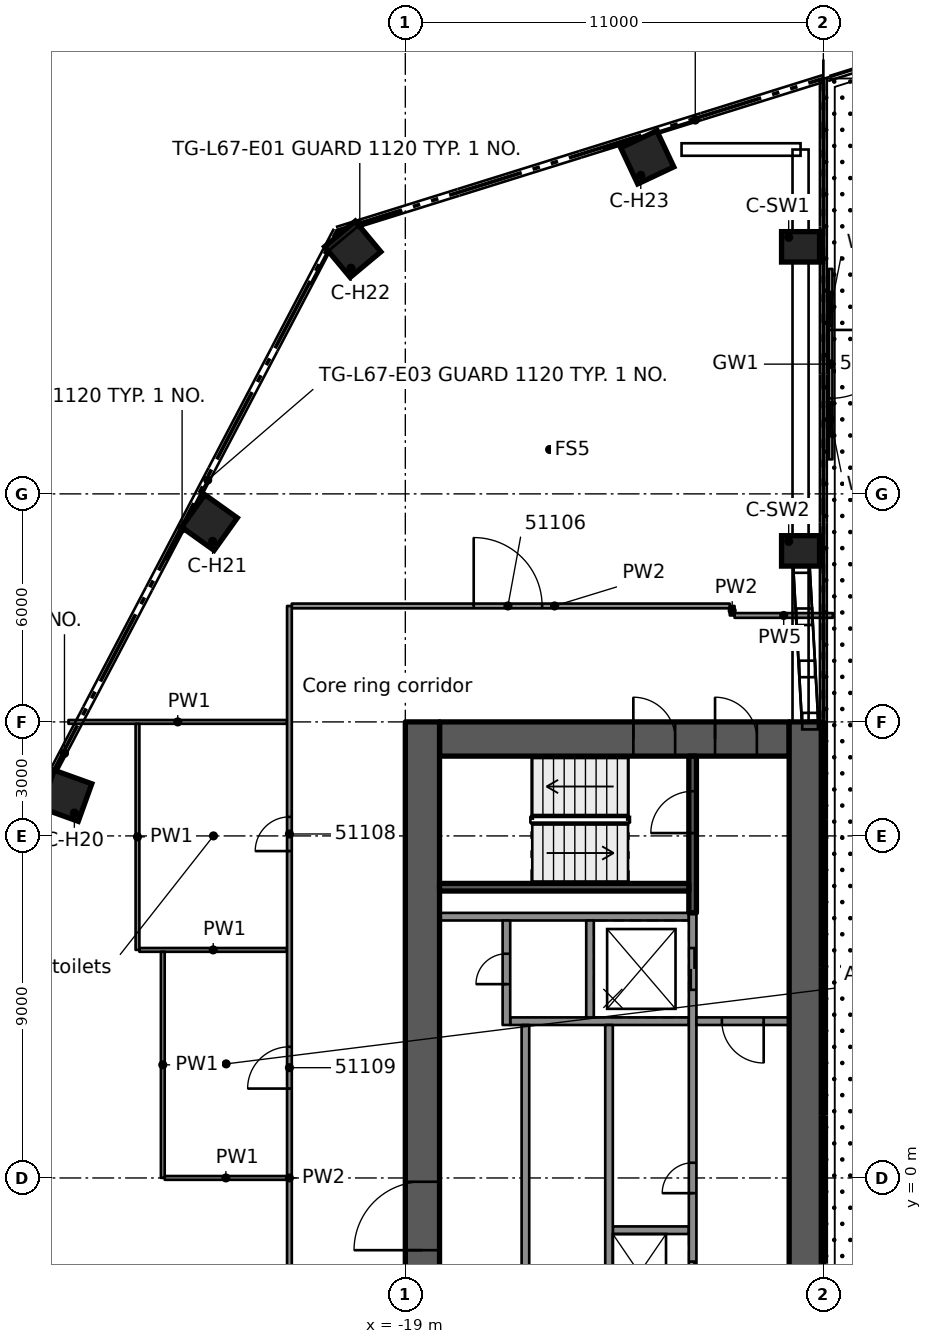
"""IFC4 building model, lengths in metres.
Left out: names, types, materials, properties, quantities, classifications, styles, units other than length and angle.
Written with IfcOpenShell. Run it as: python <this file> out.ifc"""

import sys

from ifc_helpers import new_model, si_unit, direction, frame, frame_2d, origin, origin_2d, place, context, subcontext, project, spatial, rectangle, extrude, element, fill, save


model = new_model("IFC4")
c1 = context("Model", 3, precision=1e-05, world=origin(), true_north=direction((0.0, 1.0)))
c2 = subcontext(c1, "Body", "Model", "MODEL_VIEW")
j1 = project(units=[si_unit("LENGTHUNIT", "METRE"), si_unit("PLANEANGLEUNIT", "RADIAN")], contexts=[c1])
p1 = place(None, origin())
s1 = spatial("IfcSite", under=j1, at=p1, CompositionType="ELEMENT")
p2 = place(p1, origin())
s2 = spatial("IfcBuilding", under=s1, at=p2, CompositionType="ELEMENT")
p3 = place(p2, frame((0.0, 0.0, 253.5)))
s3 = spatial("IfcBuildingStorey", under=s2, at=p3, CompositionType="ELEMENT", Elevation=253.5)
p4 = place(p3, frame((-18.1, 11.55, 0.0), z_axis=(0.0, 0.0, 1.0), x_axis=(1.0, 0.0, 0.0)))
e1 = element("IfcWall", 1, at=p4, inside=s3, PredefinedType="SHEAR", context=c2, shape_type="SweptSolid", body=[
    extrude(rectangle(XDim=9.2, YDim=0.9, at=frame_2d((4.6, 0.0))), origin(), (0.0, 0.0, 1.0), 3.5),
])
p5 = place(p4, frame((7.25, 0.0, 0.0)))
e2 = element("IfcOpeningElement", 2, at=p5, cuts=e1, PredefinedType="OPENING", context=c2, shape_type="SweptSolid", body=[
    extrude(rectangle(XDim=1.1, YDim=2.1, at=frame_2d((0.55, 1.05))), frame((0.0, 0.46, 0.0), z_axis=(0.0, -1.0, 0.0), x_axis=(1.0, 0.0, 0.0)), (0.0, 0.0, 1.0), 0.92),
])
p6 = place(p4, frame((5.1, 0.0, 0.0)))
e3 = element("IfcOpeningElement", 3, at=p6, cuts=e1, PredefinedType="OPENING", context=c2, shape_type="SweptSolid", body=[
    extrude(rectangle(XDim=1.1, YDim=2.1, at=frame_2d((0.55, 1.05))), frame((0.0, 0.46, 0.0), z_axis=(0.0, -1.0, 0.0), x_axis=(1.0, 0.0, 0.0)), (0.0, 0.0, 1.0), 0.92),
])
p7 = place(p3, frame((-18.55, -12.0, 0.0), z_axis=(0.0, 0.0, 1.0), x_axis=(0.0, 1.0, 0.0)))
e4 = element("IfcWall", 4, at=p7, inside=s3, PredefinedType="SHEAR", context=c2, shape_type="SweptSolid", body=[
    extrude(rectangle(XDim=24.0, YDim=0.9, at=frame_2d((12.0, 0.0))), origin(), (0.0, 0.0, 1.0), 3.5),
])
p8 = place(p7, frame((10.1, 0.0, 0.0)))
e5 = element("IfcOpeningElement", 5, at=p8, cuts=e4, PredefinedType="OPENING", context=c2, shape_type="SweptSolid", body=[
    extrude(rectangle(XDim=1.8, YDim=2.1, at=frame_2d((0.9, 1.05))), frame((0.0, 0.46, 0.0), z_axis=(0.0, -1.0, 0.0), x_axis=(1.0, 0.0, 0.0)), (0.0, 0.0, 1.0), 0.92),
])
p9 = place(p3, frame((-8.45, -12.0, 0.0), z_axis=(0.0, 0.0, 1.0), x_axis=(0.0, 1.0, 0.0)))
e6 = element("IfcWall", 6, at=p9, inside=s3, PredefinedType="SHEAR", context=c2, shape_type="SweptSolid", body=[
    extrude(rectangle(XDim=24.0, YDim=0.9, at=frame_2d((12.0, 0.0))), origin(), (0.0, 0.0, 1.0), 3.5),
])
for number, where, z_axis, x_axis in (
    (7, (-27.923, 10.056, 0.0), (0.0, 0.0, 1.0), (-0.941, 0.339, 0.0)),
    (8, (-24.154, 17.246, 0.0), (0.0, 0.0, 1.0), (-0.814, 0.581, 0.0)),
    (9, (-20.384, 24.437, 0.0), (0.0, 0.0, 1.0), (-0.641, 0.768, 0.0)),
    (10, (-12.634, 26.855, 0.0), (0.0, 0.0, 1.0), (-0.426, 0.905, 0.0)),
):
    element("IfcColumn", number, at=place(p3, frame(where, z_axis=z_axis, x_axis=x_axis)), inside=s3, PredefinedType="COLUMN", context=c2, shape_type="SweptSolid", body=[
        extrude(rectangle(XDim=1.05, YDim=1.05, at=origin_2d()), origin(), (0.0, 0.0, 1.0), 3.5),
    ])
for number, where, z_axis, x_axis in (
    (11, (-8.6, 24.5, 0.0), (0.0, 0.0, 1.0), (1.0, 0.0, 0.0)),
    (12, (-8.6, 16.5, 0.0), (0.0, 0.0, 1.0), (1.0, 0.0, 0.0)),
):
    element("IfcColumn", number, at=place(p3, frame(where, z_axis=z_axis, x_axis=x_axis)), inside=s3, PredefinedType="COLUMN", context=c2, shape_type="SweptSolid", body=[
        extrude(rectangle(XDim=1.0, YDim=0.8, at=origin_2d()), origin(), (0.0, 0.0, 1.0), 3.5),
    ])
p10 = place(p3, frame((-11.54, 6.875, 0.0), z_axis=(0.0, 0.0, 1.0), x_axis=(-1.0, 0.0, 0.0)))
e13 = element("IfcWall", 13, at=p10, inside=s3, PredefinedType="SOLIDWALL", context=c2, shape_type="SweptSolid", body=[
    extrude(rectangle(XDim=6.56, YDim=0.2, at=frame_2d((3.28, 0.0))), origin(), (0.0, 0.0, 1.0), 3.09),
])
p11 = place(p3, frame((-11.54, -1.375, 0.0), z_axis=(0.0, 0.0, 1.0), x_axis=(-1.0, 0.0, 0.0)))
e14 = element("IfcWall", 14, at=p11, inside=s3, PredefinedType="SOLIDWALL", context=c2, shape_type="SweptSolid", body=[
    extrude(rectangle(XDim=2.0, YDim=0.2, at=frame_2d((1.0, 0.0))), origin(), (0.0, 0.0, 1.0), 3.09),
])
p12 = place(p3, frame((-11.54, 4.125, 0.0), z_axis=(0.0, 0.0, 1.0), x_axis=(-1.0, 0.0, 0.0)))
e15 = element("IfcWall", 15, at=p12, inside=s3, PredefinedType="SOLIDWALL", context=c2, shape_type="SweptSolid", body=[
    extrude(rectangle(XDim=4.7, YDim=0.2, at=frame_2d((2.35, 0.0))), origin(), (0.0, 0.0, 1.0), 3.09),
])
p13 = place(p3, frame((-11.44, -6.975, 0.0), z_axis=(0.0, 0.0, 1.0), x_axis=(0.0, 1.0, 0.0)))
e16 = element("IfcWall", 16, at=p13, inside=s3, PredefinedType="SOLIDWALL", context=c2, shape_type="SweptSolid", body=[
    extrude(rectangle(XDim=13.95, YDim=0.2, at=frame_2d((6.975, 0.0))), origin(), (0.0, 0.0, 1.0), 3.09),
])
p14 = place(p13, frame((0.925, 0.0, 0.0)))
e17 = element("IfcOpeningElement", 17, at=p14, cuts=e16, PredefinedType="OPENING", context=c2, shape_type="SweptSolid", body=[
    extrude(rectangle(XDim=1.1, YDim=2.1, at=frame_2d((0.55, 1.05))), frame((0.0, 0.11, 0.0), z_axis=(0.0, -1.0, 0.0), x_axis=(1.0, 0.0, 0.0)), (0.0, 0.0, 1.0), 0.22),
])
p15 = place(p13, frame((3.675, 0.0, 0.0)))
e18 = element("IfcOpeningElement", 18, at=p15, cuts=e16, PredefinedType="OPENING", context=c2, shape_type="SweptSolid", body=[
    extrude(rectangle(XDim=1.1, YDim=2.1, at=frame_2d((0.55, 1.05))), frame((0.0, 0.11, 0.0), z_axis=(0.0, -1.0, 0.0), x_axis=(1.0, 0.0, 0.0)), (0.0, 0.0, 1.0), 0.22),
])
p16 = place(p13, frame((11.925, 0.0, 0.0)))
e19 = element("IfcOpeningElement", 19, at=p16, cuts=e16, PredefinedType="OPENING", context=c2, shape_type="SweptSolid", body=[
    extrude(rectangle(XDim=1.1, YDim=2.1, at=frame_2d((0.55, 1.05))), frame((0.0, 0.11, 0.0), z_axis=(0.0, -1.0, 0.0), x_axis=(1.0, 0.0, 0.0)), (0.0, 0.0, 1.0), 0.22),
])
p17 = place(p13, frame((6.575, 0.0, 0.0)))
e20 = element("IfcOpeningElement", 20, at=p17, cuts=e16, PredefinedType="OPENING", context=c2, shape_type="SweptSolid", body=[
    extrude(rectangle(XDim=0.8, YDim=2.1, at=frame_2d((0.4, 1.05))), frame((0.0, 0.11, 0.0), z_axis=(0.0, -1.0, 0.0), x_axis=(1.0, 0.0, 0.0)), (0.0, 0.0, 1.0), 0.22),
])
p18 = place(p3, frame((-13.64, -4.025, 0.0), z_axis=(0.0, 0.0, 1.0), x_axis=(0.0, 1.0, 0.0)))
e21 = element("IfcWall", 21, at=p18, inside=s3, PredefinedType="SOLIDWALL", context=c2, shape_type="SweptSolid", body=[
    extrude(rectangle(XDim=8.05, YDim=0.2, at=frame_2d((4.025, 0.0))), origin(), (0.0, 0.0, 1.0), 3.09),
])
p19 = place(p3, frame((-14.14, 4.225, 0.0), z_axis=(0.0, 0.0, 1.0), x_axis=(0.0, 1.0, 0.0)))
e22 = element("IfcWall", 22, at=p19, inside=s3, PredefinedType="SOLIDWALL", context=c2, shape_type="SweptSolid", body=[
    extrude(rectangle(XDim=2.55, YDim=0.2, at=frame_2d((1.275, 0.0))), origin(), (0.0, 0.0, 1.0), 3.09),
])
p20 = place(p3, frame((-15.84, -4.025, 0.0), z_axis=(0.0, 0.0, 1.0), x_axis=(0.0, 1.0, 0.0)))
e23 = element("IfcWall", 23, at=p20, inside=s3, PredefinedType="SOLIDWALL", context=c2, shape_type="SweptSolid", body=[
    extrude(rectangle(XDim=8.05, YDim=0.2, at=frame_2d((4.025, 0.0))), origin(), (0.0, 0.0, 1.0), 3.09),
])
p21 = place(p20, frame((0.875, 0.0, 0.0)))
e24 = element("IfcOpeningElement", 24, at=p21, cuts=e23, PredefinedType="OPENING", context=c2, shape_type="SweptSolid", body=[
    extrude(rectangle(XDim=0.8, YDim=2.1, at=frame_2d((0.4, 1.05))), frame((0.0, 0.11, 0.0), z_axis=(0.0, -1.0, 0.0), x_axis=(1.0, 0.0, 0.0)), (0.0, 0.0, 1.0), 0.22),
])
p22 = place(p3, frame((-16.34, 4.025, 0.0), z_axis=(0.0, 0.0, 1.0), x_axis=(0.0, 1.0, 0.0)))
e25 = element("IfcWall", 25, at=p22, inside=s3, PredefinedType="SOLIDWALL", context=c2, shape_type="SweptSolid", body=[
    extrude(rectangle(XDim=2.75, YDim=0.2, at=frame_2d((1.375, 0.0))), origin(), (0.0, 0.0, 1.0), 3.09),
])
p23 = place(p22, frame((1.075, 0.0, 0.0)))
e26 = element("IfcOpeningElement", 26, at=p23, cuts=e25, PredefinedType="OPENING", context=c2, shape_type="SweptSolid", body=[
    extrude(rectangle(XDim=0.8, YDim=2.1, at=frame_2d((0.4, 1.05))), frame((0.0, 0.11, 0.0), z_axis=(0.0, -1.0, 0.0), x_axis=(1.0, 0.0, 0.0)), (0.0, 0.0, 1.0), 0.22),
])
p24 = place(p3, frame((-11.44, 6.975, 0.0), z_axis=(0.0, 0.0, 1.0), x_axis=(0.0, 1.0, 0.0)))
e27 = element("IfcWall", 27, at=p24, inside=s3, PredefinedType="SOLIDWALL", context=c2, shape_type="SweptSolid", body=[
    extrude(rectangle(XDim=4.125, YDim=0.2, at=frame_2d((2.062, 0.0))), origin(), (0.0, 0.0, 1.0), 3.09),
])
p25 = place(p24, frame((2.1, 0.0, 0.0)))
e28 = element("IfcOpeningElement", 28, at=p25, cuts=e27, PredefinedType="OPENING", context=c2, shape_type="SweptSolid", body=[
    extrude(rectangle(XDim=1.1, YDim=2.1, at=frame_2d((0.55, 1.05))), frame((0.0, 0.11, 0.0), z_axis=(0.0, -1.0, 0.0), x_axis=(1.0, 0.0, 0.0)), (0.0, 0.0, 1.0), 0.22),
])
p26 = place(p3, frame((-11.54, 7.65, 0.0), z_axis=(0.0, 0.0, 1.0), x_axis=(-1.0, 0.0, 0.0)))
e29 = element("IfcWall", 29, at=p26, inside=s3, PredefinedType="SOLIDWALL", context=c2, shape_type="SweptSolid", body=[
    extrude(rectangle(XDim=6.56, YDim=0.2, at=frame_2d((3.28, 0.0))), origin(), (0.0, 0.0, 1.0), 3.09),
])
p27 = place(p3, frame((-8.9, 4.125, 0.0), z_axis=(0.0, 0.0, 1.0), x_axis=(-1.0, 0.0, 0.0)))
e30 = element("IfcWall", 30, at=p27, inside=s3, PredefinedType="PARTITIONING", context=c2, shape_type="SweptSolid", body=[
    extrude(rectangle(XDim=2.44, YDim=0.2, at=frame_2d((1.22, 0.0))), origin(), (0.0, 0.0, 1.0), 3.09),
])
p28 = place(p27, frame((0.67, 0.0, 0.0)))
e31 = element("IfcOpeningElement", 31, at=p28, cuts=e30, PredefinedType="OPENING", context=c2, shape_type="SweptSolid", body=[
    extrude(rectangle(XDim=1.1, YDim=2.1, at=frame_2d((0.55, 1.05))), frame((0.0, 0.11, 0.0), z_axis=(0.0, -1.0, 0.0), x_axis=(1.0, 0.0, 0.0)), (0.0, 0.0, 1.0), 0.22),
])
p29 = place(p3, frame((-7.81, 23.919, 0.0), z_axis=(0.0, 0.0, 1.0), x_axis=(0.0, -1.0, 0.0)))
e32 = element("IfcWall", 32, at=p29, inside=s3, PredefinedType="STANDARD", context=c2, shape_type="SweptSolid", body=[
    extrude(rectangle(XDim=5.011, YDim=0.1, at=frame_2d((2.505, 0.0))), origin(), (0.0, 0.0, 1.0), 3.1),
])
p30 = place(p29, frame((1.605, 0.0, 0.0)))
e33 = element("IfcOpeningElement", 33, at=p30, cuts=e32, PredefinedType="OPENING", context=c2, shape_type="SweptSolid", body=[
    extrude(rectangle(XDim=1.8, YDim=2.4, at=frame_2d((0.9, 1.2))), frame((0.0, 0.06, 0.0), z_axis=(0.0, -1.0, 0.0), x_axis=(1.0, 0.0, 0.0)), (0.0, 0.0, 1.0), 0.12),
])
p31 = place(p29, frame((0.605, 0.0, 0.0)))
e34 = element("IfcOpeningElement", 34, at=p31, cuts=e32, PredefinedType="OPENING", context=c2, shape_type="SweptSolid", body=[
    extrude(rectangle(XDim=0.9, YDim=2.4, at=frame_2d((0.45, 1.2))), frame((0.0, 0.06, 0.0), z_axis=(0.0, -1.0, 0.0), x_axis=(1.0, 0.0, 0.0)), (0.0, 0.0, 1.0), 0.12),
])
p32 = place(p29, frame((3.505, 0.0, 0.0)))
e35 = element("IfcOpeningElement", 35, at=p32, cuts=e32, PredefinedType="OPENING", context=c2, shape_type="SweptSolid", body=[
    extrude(rectangle(XDim=0.9, YDim=2.4, at=frame_2d((0.45, 1.2))), frame((0.0, 0.06, 0.0), z_axis=(0.0, -1.0, 0.0), x_axis=(1.0, 0.0, 0.0)), (0.0, 0.0, 1.0), 0.12),
])
p33 = place(p3, frame((-25.331, 0.001, 0.0), z_axis=(0.0, 0.0, 1.0), x_axis=(1.0, 0.0, 0.0)))
e36 = element("IfcWall", 36, at=p33, inside=s3, PredefinedType="PARTITIONING", context=c2, shape_type="SweptSolid", body=[
    extrude(rectangle(XDim=3.218, YDim=0.1, at=frame_2d((1.609, 0.0))), origin(), (0.0, 0.0, 1.0), 3.08),
])
p34 = place(p3, frame((-25.998, 6.001, 0.0), z_axis=(0.0, 0.0, 1.0), x_axis=(1.0, 0.0, 0.0)))
e37 = element("IfcWall", 37, at=p34, inside=s3, PredefinedType="PARTITIONING", context=c2, shape_type="SweptSolid", body=[
    extrude(rectangle(XDim=3.885, YDim=0.1, at=frame_2d((1.942, 0.0))), origin(), (0.0, 0.0, 1.0), 3.08),
])
p35 = place(p3, frame((-27.864, 12.0, 0.0), z_axis=(0.0, 0.0, 1.0), x_axis=(1.0, 0.0, 0.0)))
e38 = element("IfcWall", 38, at=p35, inside=s3, PredefinedType="PARTITIONING", context=c2, shape_type="SweptSolid", body=[
    extrude(rectangle(XDim=5.751, YDim=0.1, at=frame_2d((2.875, 0.0))), origin(), (0.0, 0.0, 1.0), 3.08),
])
p36 = place(p3, frame((-10.336, 14.801, 0.0), z_axis=(0.0, 0.0, 1.0), x_axis=(1.0, 0.0, 0.0)))
e39 = element("IfcWall", 39, at=p36, inside=s3, PredefinedType="PARTITIONING", context=c2, shape_type="SweptSolid", body=[
    extrude(rectangle(XDim=2.586, YDim=0.125, at=frame_2d((1.293, 0.0))), origin(), (0.0, 0.0, 1.0), 2.496),
])
p37 = place(p3, frame((-21.988, 15.051, 0.0), z_axis=(0.0, 0.0, 1.0), x_axis=(1.0, 0.0, 0.0)))
e40 = element("IfcWall", 40, at=p37, inside=s3, PredefinedType="PARTITIONING", context=c2, shape_type="SweptSolid", body=[
    extrude(rectangle(XDim=11.525, YDim=0.125, at=frame_2d((5.763, 0.0))), origin(), (0.0, 0.0, 1.0), 3.08),
])
p38 = place(p37, frame((4.788, 0.0, 0.0)))
e41 = element("IfcOpeningElement", 41, at=p38, cuts=e40, PredefinedType="OPENING", context=c2, shape_type="SweptSolid", body=[
    extrude(rectangle(XDim=1.8, YDim=2.1, at=frame_2d((0.9, 1.05))), frame((0.0, 0.073, 0.0), z_axis=(0.0, -1.0, 0.0), x_axis=(1.0, 0.0, 0.0)), (0.0, 0.0, 1.0), 0.145),
])
p39 = place(p3, frame((-10.399, 14.801, 0.0), z_axis=(0.0, 0.0, 1.0), x_axis=(0.0, 1.0, 0.0)))
e42 = element("IfcWall", 42, at=p39, inside=s3, PredefinedType="PARTITIONING", context=c2, shape_type="SweptSolid", body=[
    extrude(rectangle(XDim=0.249, YDim=0.125, at=frame_2d((0.125, 0.0))), origin(), (0.0, 0.0, 1.0), 3.08),
])
p40 = place(p3, frame((-22.05, -15.051, 0.0), z_axis=(0.0, 0.0, 1.0), x_axis=(0.0, 1.0, 0.0)))
e43 = element("IfcWall", 43, at=p40, inside=s3, PredefinedType="PARTITIONING", context=c2, shape_type="SweptSolid", body=[
    extrude(rectangle(XDim=30.102, YDim=0.125, at=frame_2d((15.051, 0.0))), origin(), (0.0, 0.0, 1.0), 3.08),
])
p41 = place(p40, frame((8.151, 0.0, 0.0)))
e44 = element("IfcOpeningElement", 44, at=p41, cuts=e43, PredefinedType="OPENING", context=c2, shape_type="SweptSolid", body=[
    extrude(rectangle(XDim=1.8, YDim=2.1, at=frame_2d((0.9, 1.05))), frame((0.0, 0.073, 0.0), z_axis=(0.0, -1.0, 0.0), x_axis=(1.0, 0.0, 0.0)), (0.0, 0.0, 1.0), 0.145),
])
p42 = place(p40, frame((23.652, 0.0, 0.0)))
e45 = element("IfcOpeningElement", 45, at=p42, cuts=e43, PredefinedType="OPENING", context=c2, shape_type="SweptSolid", body=[
    extrude(rectangle(XDim=0.9, YDim=2.1, at=frame_2d((0.45, 1.05))), frame((0.0, 0.073, 0.0), z_axis=(0.0, -1.0, 0.0), x_axis=(1.0, 0.0, 0.0)), (0.0, 0.0, 1.0), 0.145),
])
p43 = place(p40, frame((17.403, 0.0, 0.0)))
e46 = element("IfcOpeningElement", 46, at=p43, cuts=e43, PredefinedType="OPENING", context=c2, shape_type="SweptSolid", body=[
    extrude(rectangle(XDim=1.1, YDim=2.1, at=frame_2d((0.55, 1.05))), frame((0.0, 0.073, 0.0), z_axis=(0.0, -1.0, 0.0), x_axis=(1.0, 0.0, 0.0)), (0.0, 0.0, 1.0), 0.145),
])
for number, where, z_axis, x_axis in (
    (47, (-25.382, 0.002, 0.0), (0.0, 0.0, 1.0), (0.0, 1.0, 0.0)),
    (48, (-26.048, 6.001, 0.0), (0.0, 0.0, 1.0), (0.0, 1.0, 0.0)),
):
    element("IfcWall", number, at=place(p3, frame(where, z_axis=z_axis, x_axis=x_axis)), inside=s3, PredefinedType="PARTITIONING", context=c2, shape_type="SweptSolid", body=[
        extrude(rectangle(XDim=5.949, YDim=0.1, at=frame_2d((2.975, 0.0))), origin(), (0.0, 0.0, 1.0), 3.08),
    ])
p44 = place(p15, origin())
e49 = element("IfcDoor", 49, at=p44, inside=s3, OperationType="DOUBLE_DOOR_SLIDING", PredefinedType="DOOR", context=c2, shape_type="SweptSolid", body=[
    extrude(rectangle(XDim=1.1, YDim=2.1, at=frame_2d((0.55, 1.05))), frame((0.0, 0.025, 0.0), z_axis=(0.0, -1.0, 0.0), x_axis=(1.0, 0.0, 0.0)), (0.0, 0.0, 1.0), 0.05),
])
fill(e18, e49)
p45 = place(p16, origin())
e50 = element("IfcDoor", 50, at=p45, inside=s3, OperationType="DOUBLE_DOOR_SLIDING", PredefinedType="DOOR", context=c2, shape_type="SweptSolid", body=[
    extrude(rectangle(XDim=1.1, YDim=2.1, at=frame_2d((0.55, 1.05))), frame((0.0, 0.025, 0.0), z_axis=(0.0, -1.0, 0.0), x_axis=(1.0, 0.0, 0.0)), (0.0, 0.0, 1.0), 0.05),
])
fill(e19, e50)
p46 = place(p17, origin())
e51 = element("IfcDoor", 51, at=p46, inside=s3, OperationType="SINGLE_SWING_LEFT", PredefinedType="DOOR", context=c2, shape_type="SweptSolid", body=[
    extrude(rectangle(XDim=0.8, YDim=2.1, at=frame_2d((0.4, 1.05))), frame((0.0, 0.025, 0.0), z_axis=(0.0, -1.0, 0.0), x_axis=(1.0, 0.0, 0.0)), (0.0, 0.0, 1.0), 0.05),
])
fill(e20, e51)
p47 = place(p23, origin())
e52 = element("IfcDoor", 52, at=p47, inside=s3, OperationType="SINGLE_SWING_LEFT", PredefinedType="DOOR", context=c2, shape_type="SweptSolid", body=[
    extrude(rectangle(XDim=0.8, YDim=2.1, at=frame_2d((0.4, 1.05))), frame((0.0, 0.025, 0.0), z_axis=(0.0, -1.0, 0.0), x_axis=(1.0, 0.0, 0.0)), (0.0, 0.0, 1.0), 0.05),
])
fill(e26, e52)
p48 = place(p8, origin())
e53 = element("IfcDoor", 53, at=p48, inside=s3, OperationType="SINGLE_SWING_LEFT", PredefinedType="DOOR", context=c2, shape_type="SweptSolid", body=[
    extrude(rectangle(XDim=1.8, YDim=2.1, at=frame_2d((0.9, 1.05))), frame((0.0, 0.025, 0.0), z_axis=(0.0, -1.0, 0.0), x_axis=(1.0, 0.0, 0.0)), (0.0, 0.0, 1.0), 0.05),
])
fill(e5, e53)
p49 = place(p5, origin())
e54 = element("IfcDoor", 54, at=p49, inside=s3, OperationType="SINGLE_SWING_RIGHT", PredefinedType="DOOR", context=c2, shape_type="SweptSolid", body=[
    extrude(rectangle(XDim=1.1, YDim=2.1, at=frame_2d((0.55, 1.05))), frame((0.0, 0.025, 0.0), z_axis=(0.0, -1.0, 0.0), x_axis=(1.0, 0.0, 0.0)), (0.0, 0.0, 1.0), 0.05),
])
fill(e2, e54)
p50 = place(p28, origin())
e55 = element("IfcDoor", 55, at=p50, inside=s3, OperationType="SINGLE_SWING_RIGHT", PredefinedType="DOOR", context=c2, shape_type="SweptSolid", body=[
    extrude(rectangle(XDim=1.1, YDim=2.1, at=frame_2d((0.55, 1.05))), frame((0.0, 0.025, 0.0), z_axis=(0.0, -1.0, 0.0), x_axis=(1.0, 0.0, 0.0)), (0.0, 0.0, 1.0), 0.05),
])
fill(e31, e55)
p51 = place(p6, origin())
e56 = element("IfcDoor", 56, at=p51, inside=s3, OperationType="SINGLE_SWING_RIGHT", PredefinedType="DOOR", context=c2, shape_type="SweptSolid", body=[
    extrude(rectangle(XDim=1.1, YDim=2.1, at=frame_2d((0.55, 1.05))), frame((0.0, 0.025, 0.0), z_axis=(0.0, -1.0, 0.0), x_axis=(1.0, 0.0, 0.0)), (0.0, 0.0, 1.0), 0.05),
])
fill(e3, e56)
p52 = place(p25, origin())
e57 = element("IfcDoor", 57, at=p52, inside=s3, OperationType="SINGLE_SWING_RIGHT", PredefinedType="DOOR", context=c2, shape_type="SweptSolid", body=[
    extrude(rectangle(XDim=1.1, YDim=2.1, at=frame_2d((0.55, 1.05))), frame((0.0, 0.025, 0.0), z_axis=(0.0, -1.0, 0.0), x_axis=(1.0, 0.0, 0.0)), (0.0, 0.0, 1.0), 0.05),
])
fill(e28, e57)
p53 = place(p30, origin())
e58 = element("IfcDoor", 58, at=p53, inside=s3, OperationType="DOUBLE_DOOR_SINGLE_SWING", PredefinedType="DOOR", context=c2, shape_type="SweptSolid", body=[
    extrude(rectangle(XDim=1.8, YDim=2.4, at=frame_2d((0.9, 1.2))), frame((0.0, 0.025, 0.0), z_axis=(0.0, -1.0, 0.0), x_axis=(1.0, 0.0, 0.0)), (0.0, 0.0, 1.0), 0.05),
])
fill(e33, e58)
p54 = place(p31, origin())
e59 = element("IfcWindow", 59, at=p54, inside=s3, PartitioningType="SINGLE_PANEL", PredefinedType="WINDOW", context=c2, shape_type="SweptSolid", body=[
    extrude(rectangle(XDim=0.9, YDim=2.4, at=frame_2d((0.45, 1.2))), frame((0.0, 0.03, 0.0), z_axis=(0.0, -1.0, 0.0), x_axis=(1.0, 0.0, 0.0)), (0.0, 0.0, 1.0), 0.06),
])
fill(e34, e59)
p55 = place(p32, origin())
e60 = element("IfcWindow", 60, at=p55, inside=s3, PartitioningType="SINGLE_PANEL", PredefinedType="WINDOW", context=c2, shape_type="SweptSolid", body=[
    extrude(rectangle(XDim=0.9, YDim=2.4, at=frame_2d((0.45, 1.2))), frame((0.0, 0.03, 0.0), z_axis=(0.0, -1.0, 0.0), x_axis=(1.0, 0.0, 0.0)), (0.0, 0.0, 1.0), 0.06),
])
fill(e35, e60)
p56 = place(p38, origin())
e61 = element("IfcDoor", 61, at=p56, inside=s3, OperationType="DOUBLE_DOOR_SINGLE_SWING", PredefinedType="DOOR", context=c2, shape_type="SweptSolid", body=[
    extrude(rectangle(XDim=1.8, YDim=2.1, at=frame_2d((0.9, 1.05))), frame((0.0, 0.025, 0.0), z_axis=(0.0, -1.0, 0.0), x_axis=(1.0, 0.0, 0.0)), (0.0, 0.0, 1.0), 0.05),
])
fill(e41, e61)
p57 = place(p42, origin())
e62 = element("IfcDoor", 62, at=p57, inside=s3, OperationType="SINGLE_SWING_RIGHT", PredefinedType="DOOR", context=c2, shape_type="SweptSolid", body=[
    extrude(rectangle(XDim=0.9, YDim=2.1, at=frame_2d((0.45, 1.05))), frame((0.0, 0.025, 0.0), z_axis=(0.0, -1.0, 0.0), x_axis=(1.0, 0.0, 0.0)), (0.0, 0.0, 1.0), 0.05),
])
fill(e45, e62)
p58 = place(p43, origin())
e63 = element("IfcDoor", 63, at=p58, inside=s3, OperationType="SINGLE_SWING_RIGHT", PredefinedType="DOOR", context=c2, shape_type="SweptSolid", body=[
    extrude(rectangle(XDim=1.1, YDim=2.1, at=frame_2d((0.55, 1.05))), frame((0.0, 0.025, 0.0), z_axis=(0.0, -1.0, 0.0), x_axis=(1.0, 0.0, 0.0)), (0.0, 0.0, 1.0), 0.05),
])
fill(e46, e63)
save(model, sys.argv[1])
